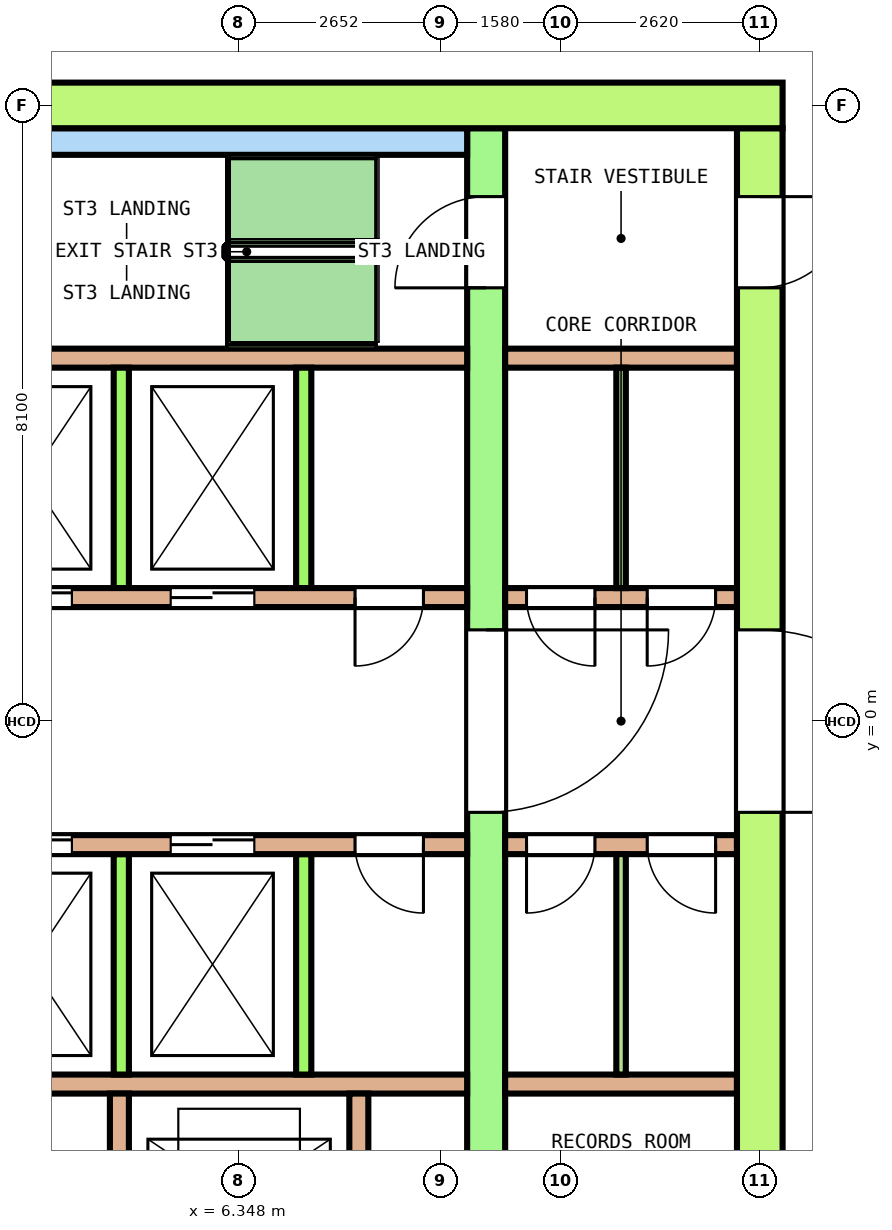
"""IFC4 building model, lengths in metres.
Left out: names, types, materials, properties, quantities, classifications, styles, units other than length and angle.
Written with IfcOpenShell. Run it as: python <this file> out.ifc"""

import sys

from ifc_helpers import new_model, si_unit, direction, frame, frame_2d, origin, place, context, subcontext, project, spatial, rectangle, extrude, element, fill, save


model = new_model("IFC4")
c1 = context("Model", 3, precision=1e-05, world=origin(), true_north=direction((0.0, 1.0)))
c2 = subcontext(c1, "Body", "Model", "MODEL_VIEW")
j1 = project(units=[si_unit("LENGTHUNIT", "METRE"), si_unit("PLANEANGLEUNIT", "RADIAN")], contexts=[c1])
p1 = place(None, origin())
s1 = spatial("IfcSite", under=j1, at=p1, CompositionType="ELEMENT")
p2 = place(p1, origin())
s2 = spatial("IfcBuilding", under=s1, at=p2, CompositionType="ELEMENT")
p3 = place(p2, frame((0.0, 0.0, 231.4)))
s3 = spatial("IfcBuildingStorey", under=s2, at=p3, CompositionType="ELEMENT", Elevation=231.4)
p4 = place(p3, frame((-13.5, 8.1, 0.0), z_axis=(0.0, 0.0, 1.0), x_axis=(1.0, 0.0, 0.0)))
e1 = element("IfcWall", 1, at=p4, inside=s3, PredefinedType="SHEAR", context=c2, shape_type="SweptSolid", body=[
    extrude(rectangle(XDim=27.0, YDim=0.6, at=frame_2d((13.5, 0.0))), origin(), (0.0, 0.0, 1.0), 5.7),
])
p5 = place(p4, frame((14.425, 0.0, 0.0)))
e2 = element("IfcOpeningElement", 2, at=p5, cuts=e1, PredefinedType="OPENING", context=c2, shape_type="SweptSolid", body=[
    extrude(rectangle(XDim=1.4, YDim=2.1, at=frame_2d((0.7, 1.05))), frame((0.0, 0.31, 0.0), z_axis=(0.0, -1.0, 0.0), x_axis=(1.0, 0.0, 0.0)), (0.0, 0.0, 1.0), 0.62),
])
p6 = place(p3, frame((13.2, -7.8, 0.0), z_axis=(0.0, 0.0, 1.0), x_axis=(0.0, 1.0, 0.0)))
e3 = element("IfcWall", 3, at=p6, inside=s3, PredefinedType="SHEAR", context=c2, shape_type="SweptSolid", body=[
    extrude(rectangle(XDim=15.6, YDim=0.6, at=frame_2d((7.8, 0.0))), origin(), (0.0, 0.0, 1.0), 5.7),
])
p7 = place(p6, frame((6.6, 0.0, 0.0)))
e4 = element("IfcOpeningElement", 4, at=p7, cuts=e3, PredefinedType="OPENING", context=c2, shape_type="SweptSolid", body=[
    extrude(rectangle(XDim=2.4, YDim=2.1, at=frame_2d((1.2, 1.05))), frame((0.0, 0.31, 0.0), z_axis=(0.0, -1.0, 0.0), x_axis=(1.0, 0.0, 0.0)), (0.0, 0.0, 1.0), 0.62),
])
p8 = place(p6, frame((13.5, 0.0, 0.0)))
e5 = element("IfcOpeningElement", 5, at=p8, cuts=e3, PredefinedType="OPENING", context=c2, shape_type="SweptSolid", body=[
    extrude(rectangle(XDim=1.2, YDim=2.1, at=frame_2d((0.6, 1.05))), frame((0.0, 0.31, 0.0), z_axis=(0.0, -1.0, 0.0), x_axis=(1.0, 0.0, 0.0)), (0.0, 0.0, 1.0), 0.62),
])
p9 = place(p6, frame((1.0, 0.0, 0.0)))
e6 = element("IfcOpeningElement", 6, at=p9, cuts=e3, PredefinedType="OPENING", context=c2, shape_type="SweptSolid", body=[
    extrude(rectangle(XDim=1.0, YDim=2.1, at=frame_2d((0.5, 1.05))), frame((0.0, 0.31, 0.0), z_axis=(0.0, -1.0, 0.0), x_axis=(1.0, 0.0, 0.0)), (0.0, 0.0, 1.0), 0.62),
])
p10 = place(p3, frame((9.6, -7.8, 0.0), z_axis=(0.0, 0.0, 1.0), x_axis=(0.0, 1.0, 0.0)))
e7 = element("IfcWall", 7, at=p10, inside=s3, PredefinedType="SHEAR", context=c2, shape_type="SweptSolid", body=[
    extrude(rectangle(XDim=15.6, YDim=0.5, at=frame_2d((7.8, 0.0))), origin(), (0.0, 0.0, 1.0), 5.7),
])
p11 = place(p10, frame((6.6, 0.0, 0.0)))
e8 = element("IfcOpeningElement", 8, at=p11, cuts=e7, PredefinedType="OPENING", context=c2, shape_type="SweptSolid", body=[
    extrude(rectangle(XDim=2.4, YDim=2.1, at=frame_2d((1.2, 1.05))), frame((0.0, 0.26, 0.0), z_axis=(0.0, -1.0, 0.0), x_axis=(1.0, 0.0, 0.0)), (0.0, 0.0, 1.0), 0.52),
])
p12 = place(p10, frame((13.5, 0.0, 0.0)))
e9 = element("IfcOpeningElement", 9, at=p12, cuts=e7, PredefinedType="OPENING", context=c2, shape_type="SweptSolid", body=[
    extrude(rectangle(XDim=1.2, YDim=2.1, at=frame_2d((0.6, 1.05))), frame((0.0, 0.26, 0.0), z_axis=(0.0, -1.0, 0.0), x_axis=(1.0, 0.0, 0.0)), (0.0, 0.0, 1.0), 0.52),
])
p13 = place(p10, frame((1.0, 0.0, 0.0)))
e10 = element("IfcOpeningElement", 10, at=p13, cuts=e7, PredefinedType="OPENING", context=c2, shape_type="SweptSolid", body=[
    extrude(rectangle(XDim=1.0, YDim=2.1, at=frame_2d((0.5, 1.05))), frame((0.0, 0.26, 0.0), z_axis=(0.0, -1.0, 0.0), x_axis=(1.0, 0.0, 0.0)), (0.0, 0.0, 1.0), 0.52),
])
p14 = place(p3, frame((-9.35, 1.625, 0.0), z_axis=(0.0, 0.0, 1.0), x_axis=(1.0, 0.0, 0.0)))
e11 = element("IfcWall", 11, at=p14, inside=s3, PredefinedType="SOLIDWALL", context=c2, shape_type="SweptSolid", body=[
    extrude(rectangle(XDim=18.7, YDim=0.25, at=frame_2d((9.35, 0.0))), origin(), (0.0, 0.0, 1.0), 5.7),
])
p15 = place(p14, frame((2.85, 0.0, 0.0)))
e12 = element("IfcOpeningElement", 12, at=p15, cuts=e11, PredefinedType="OPENING", context=c2, shape_type="SweptSolid", body=[
    extrude(rectangle(XDim=1.1, YDim=2.1, at=frame_2d((0.55, 1.05))), frame((0.0, 0.135, 0.0), z_axis=(0.0, -1.0, 0.0), x_axis=(1.0, 0.0, 0.0)), (0.0, 0.0, 1.0), 0.27),
])
p16 = place(p14, frame((5.15, 0.0, 0.0)))
e13 = element("IfcOpeningElement", 13, at=p16, cuts=e11, PredefinedType="OPENING", context=c2, shape_type="SweptSolid", body=[
    extrude(rectangle(XDim=1.1, YDim=2.1, at=frame_2d((0.55, 1.05))), frame((0.0, 0.135, 0.0), z_axis=(0.0, -1.0, 0.0), x_axis=(1.0, 0.0, 0.0)), (0.0, 0.0, 1.0), 0.27),
])
p17 = place(p14, frame((7.65, 0.0, 0.0)))
e14 = element("IfcOpeningElement", 14, at=p17, cuts=e11, PredefinedType="OPENING", context=c2, shape_type="SweptSolid", body=[
    extrude(rectangle(XDim=1.1, YDim=2.1, at=frame_2d((0.55, 1.05))), frame((0.0, 0.135, 0.0), z_axis=(0.0, -1.0, 0.0), x_axis=(1.0, 0.0, 0.0)), (0.0, 0.0, 1.0), 0.27),
])
p18 = place(p14, frame((9.95, 0.0, 0.0)))
e15 = element("IfcOpeningElement", 15, at=p18, cuts=e11, PredefinedType="OPENING", context=c2, shape_type="SweptSolid", body=[
    extrude(rectangle(XDim=1.1, YDim=2.1, at=frame_2d((0.55, 1.05))), frame((0.0, 0.135, 0.0), z_axis=(0.0, -1.0, 0.0), x_axis=(1.0, 0.0, 0.0)), (0.0, 0.0, 1.0), 0.27),
])
p19 = place(p14, frame((12.4, 0.0, 0.0)))
e16 = element("IfcOpeningElement", 16, at=p19, cuts=e11, PredefinedType="OPENING", context=c2, shape_type="SweptSolid", body=[
    extrude(rectangle(XDim=1.1, YDim=2.1, at=frame_2d((0.55, 1.05))), frame((0.0, 0.135, 0.0), z_axis=(0.0, -1.0, 0.0), x_axis=(1.0, 0.0, 0.0)), (0.0, 0.0, 1.0), 0.27),
])
p20 = place(p14, frame((14.8, 0.0, 0.0)))
e17 = element("IfcOpeningElement", 17, at=p20, cuts=e11, PredefinedType="OPENING", context=c2, shape_type="SweptSolid", body=[
    extrude(rectangle(XDim=1.1, YDim=2.1, at=frame_2d((0.55, 1.05))), frame((0.0, 0.135, 0.0), z_axis=(0.0, -1.0, 0.0), x_axis=(1.0, 0.0, 0.0)), (0.0, 0.0, 1.0), 0.27),
])
p21 = place(p14, frame((0.575, 0.0, 0.0)))
e18 = element("IfcOpeningElement", 18, at=p21, cuts=e11, PredefinedType="OPENING", context=c2, shape_type="SweptSolid", body=[
    extrude(rectangle(XDim=0.9, YDim=2.1, at=frame_2d((0.45, 1.05))), frame((0.0, 0.135, 0.0), z_axis=(0.0, -1.0, 0.0), x_axis=(1.0, 0.0, 0.0)), (0.0, 0.0, 1.0), 0.27),
])
p22 = place(p14, frame((17.225, 0.0, 0.0)))
e19 = element("IfcOpeningElement", 19, at=p22, cuts=e11, PredefinedType="OPENING", context=c2, shape_type="SweptSolid", body=[
    extrude(rectangle(XDim=0.9, YDim=2.1, at=frame_2d((0.45, 1.05))), frame((0.0, 0.135, 0.0), z_axis=(0.0, -1.0, 0.0), x_axis=(1.0, 0.0, 0.0)), (0.0, 0.0, 1.0), 0.27),
])
p23 = place(p3, frame((9.85, 1.625, 0.0), z_axis=(0.0, 0.0, 1.0), x_axis=(1.0, 0.0, 0.0)))
e20 = element("IfcWall", 20, at=p23, inside=s3, PredefinedType="SOLIDWALL", context=c2, shape_type="SweptSolid", body=[
    extrude(rectangle(XDim=3.05, YDim=0.25, at=frame_2d((1.525, 0.0))), origin(), (0.0, 0.0, 1.0), 5.7),
])
p24 = place(p23, frame((0.281, 0.0, 0.0)))
e21 = element("IfcOpeningElement", 21, at=p24, cuts=e20, PredefinedType="OPENING", context=c2, shape_type="SweptSolid", body=[
    extrude(rectangle(XDim=0.9, YDim=2.1, at=frame_2d((0.45, 1.05))), frame((0.0, 0.135, 0.0), z_axis=(0.0, -1.0, 0.0), x_axis=(1.0, 0.0, 0.0)), (0.0, 0.0, 1.0), 0.27),
])
p25 = place(p23, frame((1.869, 0.0, 0.0)))
e22 = element("IfcOpeningElement", 22, at=p25, cuts=e20, PredefinedType="OPENING", context=c2, shape_type="SweptSolid", body=[
    extrude(rectangle(XDim=0.9, YDim=2.1, at=frame_2d((0.45, 1.05))), frame((0.0, 0.135, 0.0), z_axis=(0.0, -1.0, 0.0), x_axis=(1.0, 0.0, 0.0)), (0.0, 0.0, 1.0), 0.27),
])
p26 = place(p3, frame((-9.35, 4.775, 0.0), z_axis=(0.0, 0.0, 1.0), x_axis=(1.0, 0.0, 0.0)))
e23 = element("IfcWall", 23, at=p26, inside=s3, PredefinedType="SOLIDWALL", context=c2, shape_type="SweptSolid", body=[
    extrude(rectangle(XDim=18.7, YDim=0.25, at=frame_2d((9.35, 0.0))), origin(), (0.0, 0.0, 1.0), 5.7),
])
p27 = place(p3, frame((9.85, 4.775, 0.0), z_axis=(0.0, 0.0, 1.0), x_axis=(1.0, 0.0, 0.0)))
e24 = element("IfcWall", 24, at=p27, inside=s3, PredefinedType="SOLIDWALL", context=c2, shape_type="SweptSolid", body=[
    extrude(rectangle(XDim=3.05, YDim=0.25, at=frame_2d((1.525, 0.0))), origin(), (0.0, 0.0, 1.0), 5.7),
])
for number, where, z_axis, x_axis in (
    (25, (4.8, 1.75, 0.0), (0.0, 0.0, 1.0), (0.0, 1.0, 0.0)),
    (26, (7.2, 1.75, 0.0), (0.0, 0.0, 1.0), (0.0, 1.0, 0.0)),
):
    element("IfcWall", number, at=place(p3, frame(where, z_axis=z_axis, x_axis=x_axis)), inside=s3, PredefinedType="SOLIDWALL", context=c2, shape_type="SweptSolid", body=[
        extrude(rectangle(XDim=2.9, YDim=0.2, at=frame_2d((1.45, 0.0))), origin(), (0.0, 0.0, 1.0), 5.7),
    ])
p28 = place(p3, frame((-9.35, -1.625, 0.0), z_axis=(0.0, 0.0, 1.0), x_axis=(1.0, 0.0, 0.0)))
e27 = element("IfcWall", 27, at=p28, inside=s3, PredefinedType="SOLIDWALL", context=c2, shape_type="SweptSolid", body=[
    extrude(rectangle(XDim=18.7, YDim=0.25, at=frame_2d((9.35, 0.0))), origin(), (0.0, 0.0, 1.0), 5.7),
])
p29 = place(p28, frame((2.85, 0.0, 0.0)))
e28 = element("IfcOpeningElement", 28, at=p29, cuts=e27, PredefinedType="OPENING", context=c2, shape_type="SweptSolid", body=[
    extrude(rectangle(XDim=1.1, YDim=2.1, at=frame_2d((0.55, 1.05))), frame((0.0, 0.135, 0.0), z_axis=(0.0, -1.0, 0.0), x_axis=(1.0, 0.0, 0.0)), (0.0, 0.0, 1.0), 0.27),
])
p30 = place(p28, frame((5.15, 0.0, 0.0)))
e29 = element("IfcOpeningElement", 29, at=p30, cuts=e27, PredefinedType="OPENING", context=c2, shape_type="SweptSolid", body=[
    extrude(rectangle(XDim=1.1, YDim=2.1, at=frame_2d((0.55, 1.05))), frame((0.0, 0.135, 0.0), z_axis=(0.0, -1.0, 0.0), x_axis=(1.0, 0.0, 0.0)), (0.0, 0.0, 1.0), 0.27),
])
p31 = place(p28, frame((7.65, 0.0, 0.0)))
e30 = element("IfcOpeningElement", 30, at=p31, cuts=e27, PredefinedType="OPENING", context=c2, shape_type="SweptSolid", body=[
    extrude(rectangle(XDim=1.1, YDim=2.1, at=frame_2d((0.55, 1.05))), frame((0.0, 0.135, 0.0), z_axis=(0.0, -1.0, 0.0), x_axis=(1.0, 0.0, 0.0)), (0.0, 0.0, 1.0), 0.27),
])
p32 = place(p28, frame((9.95, 0.0, 0.0)))
e31 = element("IfcOpeningElement", 31, at=p32, cuts=e27, PredefinedType="OPENING", context=c2, shape_type="SweptSolid", body=[
    extrude(rectangle(XDim=1.1, YDim=2.1, at=frame_2d((0.55, 1.05))), frame((0.0, 0.135, 0.0), z_axis=(0.0, -1.0, 0.0), x_axis=(1.0, 0.0, 0.0)), (0.0, 0.0, 1.0), 0.27),
])
p33 = place(p28, frame((12.4, 0.0, 0.0)))
e32 = element("IfcOpeningElement", 32, at=p33, cuts=e27, PredefinedType="OPENING", context=c2, shape_type="SweptSolid", body=[
    extrude(rectangle(XDim=1.1, YDim=2.1, at=frame_2d((0.55, 1.05))), frame((0.0, 0.135, 0.0), z_axis=(0.0, -1.0, 0.0), x_axis=(1.0, 0.0, 0.0)), (0.0, 0.0, 1.0), 0.27),
])
p34 = place(p28, frame((14.8, 0.0, 0.0)))
e33 = element("IfcOpeningElement", 33, at=p34, cuts=e27, PredefinedType="OPENING", context=c2, shape_type="SweptSolid", body=[
    extrude(rectangle(XDim=1.1, YDim=2.1, at=frame_2d((0.55, 1.05))), frame((0.0, 0.135, 0.0), z_axis=(0.0, -1.0, 0.0), x_axis=(1.0, 0.0, 0.0)), (0.0, 0.0, 1.0), 0.27),
])
p35 = place(p28, frame((0.575, 0.0, 0.0)))
e34 = element("IfcOpeningElement", 34, at=p35, cuts=e27, PredefinedType="OPENING", context=c2, shape_type="SweptSolid", body=[
    extrude(rectangle(XDim=0.9, YDim=2.1, at=frame_2d((0.45, 1.05))), frame((0.0, 0.135, 0.0), z_axis=(0.0, -1.0, 0.0), x_axis=(1.0, 0.0, 0.0)), (0.0, 0.0, 1.0), 0.27),
])
p36 = place(p28, frame((17.225, 0.0, 0.0)))
e35 = element("IfcOpeningElement", 35, at=p36, cuts=e27, PredefinedType="OPENING", context=c2, shape_type="SweptSolid", body=[
    extrude(rectangle(XDim=0.9, YDim=2.1, at=frame_2d((0.45, 1.05))), frame((0.0, 0.135, 0.0), z_axis=(0.0, -1.0, 0.0), x_axis=(1.0, 0.0, 0.0)), (0.0, 0.0, 1.0), 0.27),
])
p37 = place(p3, frame((9.85, -1.625, 0.0), z_axis=(0.0, 0.0, 1.0), x_axis=(1.0, 0.0, 0.0)))
e36 = element("IfcWall", 36, at=p37, inside=s3, PredefinedType="SOLIDWALL", context=c2, shape_type="SweptSolid", body=[
    extrude(rectangle(XDim=3.05, YDim=0.25, at=frame_2d((1.525, 0.0))), origin(), (0.0, 0.0, 1.0), 5.7),
])
p38 = place(p37, frame((0.281, 0.0, 0.0)))
e37 = element("IfcOpeningElement", 37, at=p38, cuts=e36, PredefinedType="OPENING", context=c2, shape_type="SweptSolid", body=[
    extrude(rectangle(XDim=0.9, YDim=2.1, at=frame_2d((0.45, 1.05))), frame((0.0, 0.135, 0.0), z_axis=(0.0, -1.0, 0.0), x_axis=(1.0, 0.0, 0.0)), (0.0, 0.0, 1.0), 0.27),
])
p39 = place(p37, frame((1.869, 0.0, 0.0)))
e38 = element("IfcOpeningElement", 38, at=p39, cuts=e36, PredefinedType="OPENING", context=c2, shape_type="SweptSolid", body=[
    extrude(rectangle(XDim=0.9, YDim=2.1, at=frame_2d((0.45, 1.05))), frame((0.0, 0.135, 0.0), z_axis=(0.0, -1.0, 0.0), x_axis=(1.0, 0.0, 0.0)), (0.0, 0.0, 1.0), 0.27),
])
p40 = place(p3, frame((-9.35, -4.775, 0.0), z_axis=(0.0, 0.0, 1.0), x_axis=(1.0, 0.0, 0.0)))
e39 = element("IfcWall", 39, at=p40, inside=s3, PredefinedType="SOLIDWALL", context=c2, shape_type="SweptSolid", body=[
    extrude(rectangle(XDim=18.7, YDim=0.25, at=frame_2d((9.35, 0.0))), origin(), (0.0, 0.0, 1.0), 5.7),
])
p41 = place(p3, frame((9.85, -4.775, 0.0), z_axis=(0.0, 0.0, 1.0), x_axis=(1.0, 0.0, 0.0)))
e40 = element("IfcWall", 40, at=p41, inside=s3, PredefinedType="SOLIDWALL", context=c2, shape_type="SweptSolid", body=[
    extrude(rectangle(XDim=3.05, YDim=0.25, at=frame_2d((1.525, 0.0))), origin(), (0.0, 0.0, 1.0), 5.7),
])
for number, where, z_axis, x_axis in (
    (41, (4.8, -4.65, 0.0), (0.0, 0.0, 1.0), (0.0, 1.0, 0.0)),
    (42, (7.2, -4.65, 0.0), (0.0, 0.0, 1.0), (0.0, 1.0, 0.0)),
):
    element("IfcWall", number, at=place(p3, frame(where, z_axis=z_axis, x_axis=x_axis)), inside=s3, PredefinedType="SOLIDWALL", context=c2, shape_type="SweptSolid", body=[
        extrude(rectangle(XDim=2.9, YDim=0.2, at=frame_2d((1.45, 0.0))), origin(), (0.0, 0.0, 1.0), 5.7),
    ])
p42 = place(p3, frame((3.55, 7.625, 0.0), z_axis=(0.0, 0.0, 1.0), x_axis=(1.0, 0.0, 0.0)))
e43 = element("IfcWall", 43, at=p42, inside=s3, PredefinedType="SOLIDWALL", context=c2, shape_type="SweptSolid", body=[
    extrude(rectangle(XDim=5.8, YDim=0.35, at=frame_2d((2.9, 0.0))), origin(), (0.0, 0.0, 1.0), 5.7),
])
p43 = place(p3, frame((4.775, -7.8, 0.0), z_axis=(0.0, 0.0, 1.0), x_axis=(0.0, 1.0, 0.0)))
e44 = element("IfcWall", 44, at=p43, inside=s3, PredefinedType="SOLIDWALL", context=c2, shape_type="SweptSolid", body=[
    extrude(rectangle(XDim=2.9, YDim=0.25, at=frame_2d((1.45, 0.0))), origin(), (0.0, 0.0, 1.0), 5.7),
])
p44 = place(p43, frame((0.9, 0.0, 0.0)))
e45 = element("IfcOpeningElement", 45, at=p44, cuts=e44, PredefinedType="OPENING", context=c2, shape_type="SweptSolid", body=[
    extrude(rectangle(XDim=1.1, YDim=2.1, at=frame_2d((0.55, 1.05))), frame((0.0, 0.135, 0.0), z_axis=(0.0, -1.0, 0.0), x_axis=(1.0, 0.0, 0.0)), (0.0, 0.0, 1.0), 0.27),
])
p45 = place(p3, frame((7.925, -7.8, 0.0), z_axis=(0.0, 0.0, 1.0), x_axis=(0.0, 1.0, 0.0)))
e46 = element("IfcWall", 46, at=p45, inside=s3, PredefinedType="SOLIDWALL", context=c2, shape_type="SweptSolid", body=[
    extrude(rectangle(XDim=2.9, YDim=0.25, at=frame_2d((1.45, 0.0))), origin(), (0.0, 0.0, 1.0), 5.7),
])
for number, where, z_axis, x_axis in (
    (47, (11.375, 1.75, 0.0), (0.0, 0.0, 1.0), (0.0, 1.0, 0.0)),
    (48, (11.375, -4.65, 0.0), (0.0, 0.0, 1.0), (0.0, 1.0, 0.0)),
):
    element("IfcWall", number, at=place(p3, frame(where, z_axis=z_axis, x_axis=x_axis)), inside=s3, PredefinedType="PARTITIONING", context=c2, shape_type="SweptSolid", body=[
        extrude(rectangle(XDim=2.9, YDim=0.125, at=frame_2d((1.45, 0.0))), origin(), (0.0, 0.0, 1.0), 5.7),
    ])
p46 = place(p19, origin())
e49 = element("IfcDoor", 49, at=p46, inside=s3, OperationType="DOUBLE_DOOR_SLIDING", PredefinedType="DOOR", context=c2, shape_type="SweptSolid", body=[
    extrude(rectangle(XDim=1.1, YDim=2.1, at=frame_2d((0.55, 1.05))), frame((0.0, 0.075, 0.0), z_axis=(0.0, -1.0, 0.0), x_axis=(1.0, 0.0, 0.0)), (0.0, 0.0, 1.0), 0.15),
])
fill(e16, e49)
p47 = place(p20, origin())
e50 = element("IfcDoor", 50, at=p47, inside=s3, OperationType="DOUBLE_DOOR_SLIDING", PredefinedType="DOOR", context=c2, shape_type="SweptSolid", body=[
    extrude(rectangle(XDim=1.1, YDim=2.1, at=frame_2d((0.55, 1.05))), frame((0.0, 0.075, 0.0), z_axis=(0.0, -1.0, 0.0), x_axis=(1.0, 0.0, 0.0)), (0.0, 0.0, 1.0), 0.15),
])
fill(e17, e50)
p48 = place(p33, origin())
e51 = element("IfcDoor", 51, at=p48, inside=s3, OperationType="DOUBLE_DOOR_SLIDING", PredefinedType="DOOR", context=c2, shape_type="SweptSolid", body=[
    extrude(rectangle(XDim=1.1, YDim=2.1, at=frame_2d((0.55, 1.05))), frame((0.0, 0.075, 0.0), z_axis=(0.0, -1.0, 0.0), x_axis=(1.0, 0.0, 0.0)), (0.0, 0.0, 1.0), 0.15),
])
fill(e32, e51)
p49 = place(p34, origin())
e52 = element("IfcDoor", 52, at=p49, inside=s3, OperationType="DOUBLE_DOOR_SLIDING", PredefinedType="DOOR", context=c2, shape_type="SweptSolid", body=[
    extrude(rectangle(XDim=1.1, YDim=2.1, at=frame_2d((0.55, 1.05))), frame((0.0, 0.075, 0.0), z_axis=(0.0, -1.0, 0.0), x_axis=(1.0, 0.0, 0.0)), (0.0, 0.0, 1.0), 0.15),
])
fill(e33, e52)
p50 = place(p11, origin())
e53 = element("IfcDoor", 53, at=p50, inside=s3, OperationType="DOUBLE_DOOR_SINGLE_SWING", PredefinedType="DOOR", context=c2, shape_type="SweptSolid", body=[
    extrude(rectangle(XDim=2.4, YDim=2.1, at=frame_2d((1.2, 1.05))), frame((0.0, 0.2, 0.0), z_axis=(0.0, -1.0, 0.0), x_axis=(1.0, 0.0, 0.0)), (0.0, 0.0, 1.0), 0.4),
])
fill(e8, e53)
p51 = place(p7, origin())
e54 = element("IfcDoor", 54, at=p51, inside=s3, OperationType="DOUBLE_DOOR_SINGLE_SWING", PredefinedType="DOOR", context=c2, shape_type="SweptSolid", body=[
    extrude(rectangle(XDim=2.4, YDim=2.1, at=frame_2d((1.2, 1.05))), frame((0.0, 0.25, 0.0), z_axis=(0.0, -1.0, 0.0), x_axis=(1.0, 0.0, 0.0)), (0.0, 0.0, 1.0), 0.5),
])
fill(e4, e54)
p52 = place(p12, origin())
e55 = element("IfcDoor", 55, at=p52, inside=s3, OperationType="SINGLE_SWING_RIGHT", PredefinedType="DOOR", context=c2, shape_type="SweptSolid", body=[
    extrude(rectangle(XDim=1.2, YDim=2.1, at=frame_2d((0.6, 1.05))), frame((0.0, 0.2, 0.0), z_axis=(0.0, -1.0, 0.0), x_axis=(1.0, 0.0, 0.0)), (0.0, 0.0, 1.0), 0.4),
])
fill(e9, e55)
p53 = place(p8, origin())
e56 = element("IfcDoor", 56, at=p53, inside=s3, OperationType="SINGLE_SWING_LEFT", PredefinedType="DOOR", context=c2, shape_type="SweptSolid", body=[
    extrude(rectangle(XDim=1.2, YDim=2.1, at=frame_2d((0.6, 1.05))), frame((0.0, 0.25, 0.0), z_axis=(0.0, -1.0, 0.0), x_axis=(1.0, 0.0, 0.0)), (0.0, 0.0, 1.0), 0.5),
])
fill(e5, e56)
p54 = place(p22, origin())
e57 = element("IfcDoor", 57, at=p54, inside=s3, OperationType="SINGLE_SWING_LEFT", PredefinedType="DOOR", context=c2, shape_type="SweptSolid", body=[
    extrude(rectangle(XDim=0.9, YDim=2.1, at=frame_2d((0.45, 1.05))), frame((0.0, 0.075, 0.0), z_axis=(0.0, -1.0, 0.0), x_axis=(1.0, 0.0, 0.0)), (0.0, 0.0, 1.0), 0.15),
])
fill(e19, e57)
p55 = place(p24, origin())
e58 = element("IfcDoor", 58, at=p55, inside=s3, OperationType="SINGLE_SWING_RIGHT", PredefinedType="DOOR", context=c2, shape_type="SweptSolid", body=[
    extrude(rectangle(XDim=0.9, YDim=2.1, at=frame_2d((0.45, 1.05))), frame((0.0, 0.075, 0.0), z_axis=(0.0, -1.0, 0.0), x_axis=(1.0, 0.0, 0.0)), (0.0, 0.0, 1.0), 0.15),
])
fill(e21, e58)
p56 = place(p25, origin())
e59 = element("IfcDoor", 59, at=p56, inside=s3, OperationType="SINGLE_SWING_LEFT", PredefinedType="DOOR", context=c2, shape_type="SweptSolid", body=[
    extrude(rectangle(XDim=0.9, YDim=2.1, at=frame_2d((0.45, 1.05))), frame((0.0, 0.075, 0.0), z_axis=(0.0, -1.0, 0.0), x_axis=(1.0, 0.0, 0.0)), (0.0, 0.0, 1.0), 0.15),
])
fill(e22, e59)
p57 = place(p36, origin())
e60 = element("IfcDoor", 60, at=p57, inside=s3, OperationType="SINGLE_SWING_LEFT", PredefinedType="DOOR", context=c2, shape_type="SweptSolid", body=[
    extrude(rectangle(XDim=0.9, YDim=2.1, at=frame_2d((0.45, 1.05))), frame((0.0, 0.075, 0.0), z_axis=(0.0, -1.0, 0.0), x_axis=(1.0, 0.0, 0.0)), (0.0, 0.0, 1.0), 0.15),
])
fill(e35, e60)
p58 = place(p38, origin())
e61 = element("IfcDoor", 61, at=p58, inside=s3, OperationType="SINGLE_SWING_RIGHT", PredefinedType="DOOR", context=c2, shape_type="SweptSolid", body=[
    extrude(rectangle(XDim=0.9, YDim=2.1, at=frame_2d((0.45, 1.05))), frame((0.0, 0.075, 0.0), z_axis=(0.0, -1.0, 0.0), x_axis=(1.0, 0.0, 0.0)), (0.0, 0.0, 1.0), 0.15),
])
fill(e37, e61)
p59 = place(p39, origin())
e62 = element("IfcDoor", 62, at=p59, inside=s3, OperationType="SINGLE_SWING_LEFT", PredefinedType="DOOR", context=c2, shape_type="SweptSolid", body=[
    extrude(rectangle(XDim=0.9, YDim=2.1, at=frame_2d((0.45, 1.05))), frame((0.0, 0.075, 0.0), z_axis=(0.0, -1.0, 0.0), x_axis=(1.0, 0.0, 0.0)), (0.0, 0.0, 1.0), 0.15),
])
fill(e38, e62)
save(model, sys.argv[1])
